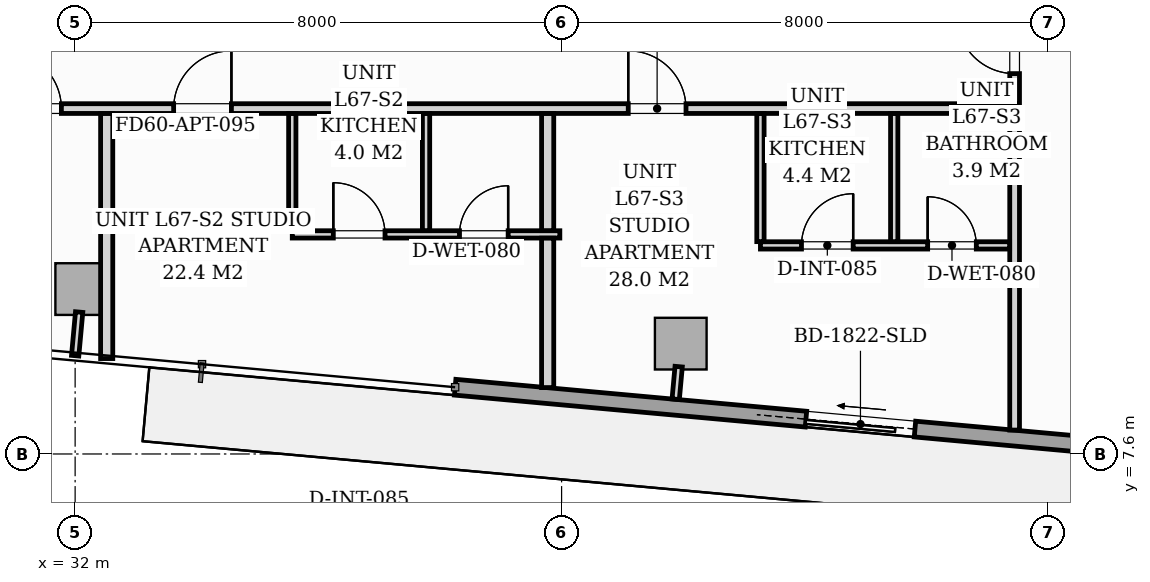
"""IFC4 building model, lengths in metres.
Left out: names, types, materials, properties, quantities, classifications, styles, units other than length and angle.
Written with IfcOpenShell. Run it as: python <this file> out.ifc"""

import sys

from ifc_helpers import new_model, si_unit, direction, frame, frame_2d, origin, origin_2d, place, context, subcontext, project, spatial, rectangle, extrude, source, transform, mapped, element, fill, save


model = new_model("IFC4")
c1 = context("Model", 3, precision=1e-05, world=origin(), true_north=direction((0.0, 1.0)))
c2 = subcontext(c1, "Body", "Model", "MODEL_VIEW")
j1 = project(units=[si_unit("LENGTHUNIT", "METRE"), si_unit("PLANEANGLEUNIT", "RADIAN")], contexts=[c1])
p1 = place(None, origin())
s1 = spatial("IfcSite", under=j1, at=p1, CompositionType="ELEMENT")
p2 = place(p1, origin())
s2 = spatial("IfcBuilding", under=s1, at=p2, CompositionType="ELEMENT")
p3 = place(p2, frame((0.0, 0.0, 233.1)))
s3 = spatial("IfcBuildingStorey", under=s2, at=p3, CompositionType="ELEMENT", Elevation=233.1)
m1 = source(origin(), c2, "Body", "SweptSolid", [
    extrude(rectangle(XDim=0.85, YDim=0.85, at=origin_2d()), origin(), (0.0, 0.0, 1.0), 3.296),
])
for number, where, z_axis, x_axis in (
    (1, (32.1, 10.312, 0.002), (0.0, 0.0, 1.0), (0.996, -0.091, 0.0)),
    (2, (41.96, 9.415, 0.002), (0.0, 0.0, 1.0), (0.996, -0.091, 0.0)),
):
    element("IfcColumn", number, at=place(p3, frame(where, z_axis=z_axis, x_axis=x_axis)), inside=s3, PredefinedType="COLUMN", context=c2, shape_type="MappedRepresentation", body=[
        mapped(m1, transform((0.0, 0.0, 0.0), scale=1.0)),
    ])
p4 = place(p3, frame((52.819, 7.372, 0.0), z_axis=(0.0, 0.0, 1.0), x_axis=(-0.995884447498, 0.090632043071, 0.0)))
e3 = element("IfcWall", 3, at=p4, inside=s3, PredefinedType="STANDARD", context=c2, shape_type="SweptSolid", body=[
    extrude(rectangle(XDim=14.63, YDim=0.26, at=frame_2d((7.315, 0.0))), origin(), (0.0, 0.0, 1.0), 3.04),
])
p5 = place(p4, frame((7.037, 0.0, 0.0)))
e4 = element("IfcOpeningElement", 4, at=p5, cuts=e3, PredefinedType="OPENING", context=c2, shape_type="SweptSolid", body=[
    extrude(rectangle(XDim=1.8, YDim=2.06, at=frame_2d((0.9, 1.03))), frame((0.0, 0.14, 0.0), z_axis=(0.0, -1.0, 0.0), x_axis=(1.0, 0.0, 0.0)), (0.0, 0.0, 1.0), 0.28),
])
p6 = place(p4, frame((2.05, 0.0, 0.65)))
e5 = element("IfcOpeningElement", 5, at=p6, cuts=e3, PredefinedType="OPENING", context=c2, shape_type="SweptSolid", body=[
    extrude(rectangle(XDim=1.6, YDim=1.5, at=frame_2d((0.8, 0.75))), frame((0.0, 0.14, 0.0), z_axis=(0.0, -1.0, 0.0), x_axis=(1.0, 0.0, 0.0)), (0.0, 0.0, 1.0), 0.28),
])
p7 = place(p3, frame((26.12, 13.28, 0.0), z_axis=(0.0, 0.0, 1.0), x_axis=(1.0, 0.0, 0.0)))
e6 = element("IfcWall", 6, at=p7, inside=s3, PredefinedType="PARTITIONING", context=c2, shape_type="SweptSolid", body=[
    extrude(rectangle(XDim=21.33, YDim=0.16, at=frame_2d((10.665, 0.0))), origin(), (0.0, 0.0, 1.0), 2.556),
])
p8 = place(p7, frame((4.704, 0.0, 0.0)))
e7 = element("IfcOpeningElement", 7, at=p8, cuts=e6, PredefinedType="OPENING", context=c2, shape_type="SweptSolid", body=[
    extrude(rectangle(XDim=0.95, YDim=2.06, at=frame_2d((0.475, 1.03))), frame((0.0, 0.09, 0.0), z_axis=(0.0, -1.0, 0.0), x_axis=(1.0, 0.0, 0.0)), (0.0, 0.0, 1.0), 0.18),
])
p9 = place(p7, frame((7.5, 0.0, 0.0)))
e8 = element("IfcOpeningElement", 8, at=p9, cuts=e6, PredefinedType="OPENING", context=c2, shape_type="SweptSolid", body=[
    extrude(rectangle(XDim=0.95, YDim=2.06, at=frame_2d((0.475, 1.03))), frame((0.0, 0.09, 0.0), z_axis=(0.0, -1.0, 0.0), x_axis=(1.0, 0.0, 0.0)), (0.0, 0.0, 1.0), 0.18),
])
p10 = place(p7, frame((14.976, 0.0, 0.0)))
e9 = element("IfcOpeningElement", 9, at=p10, cuts=e6, PredefinedType="OPENING", context=c2, shape_type="SweptSolid", body=[
    extrude(rectangle(XDim=0.95, YDim=2.06, at=frame_2d((0.475, 1.03))), frame((0.0, 0.09, 0.0), z_axis=(0.0, -1.0, 0.0), x_axis=(1.0, 0.0, 0.0)), (0.0, 0.0, 1.0), 0.18),
])
p11 = place(p3, frame((47.45, 7.993, 0.0), z_axis=(0.0, 0.0, 1.0), x_axis=(0.0, 1.0, 0.0)))
e10 = element("IfcWall", 10, at=p11, inside=s3, PredefinedType="PARTITIONING", context=c2, shape_type="SweptSolid", body=[
    extrude(rectangle(XDim=5.205, YDim=0.16, at=frame_2d((2.603, 0.0))), origin(), (0.0, 0.0, 1.0), 3.04),
])
p12 = place(p3, frame((47.45, 13.362, 0.0), z_axis=(0.0, 0.0, 1.0), x_axis=(0.0, 1.0, 0.0)))
e11 = element("IfcWall", 11, at=p12, inside=s3, PredefinedType="PARTITIONING", context=c2, shape_type="SweptSolid", body=[
    extrude(rectangle(XDim=7.288, YDim=0.16, at=frame_2d((3.644, 0.0))), origin(), (0.0, 0.0, 1.0), 3.04),
])
p13 = place(p12, frame((0.493, 0.0, 0.0)))
e12 = element("IfcOpeningElement", 12, at=p13, cuts=e11, PredefinedType="OPENING", context=c2, shape_type="SweptSolid", body=[
    extrude(rectangle(XDim=0.95, YDim=2.06, at=frame_2d((0.475, 1.03))), frame((0.0, 0.09, 0.0), z_axis=(0.0, -1.0, 0.0), x_axis=(1.0, 0.0, 0.0)), (0.0, 0.0, 1.0), 0.18),
])
p14 = place(p12, frame((4.783, 0.0, 0.0)))
e13 = element("IfcOpeningElement", 13, at=p14, cuts=e11, PredefinedType="OPENING", context=c2, shape_type="SweptSolid", body=[
    extrude(rectangle(XDim=0.95, YDim=2.06, at=frame_2d((0.475, 1.03))), frame((0.0, 0.09, 0.0), z_axis=(0.0, -1.0, 0.0), x_axis=(1.0, 0.0, 0.0)), (0.0, 0.0, 1.0), 0.18),
])
p15 = place(p3, frame((32.519, 9.169, 0.0), z_axis=(0.0, 0.0, 1.0), x_axis=(0.0, 1.0, 0.0)))
e14 = element("IfcWall", 14, at=p15, inside=s3, PredefinedType="PARTITIONING", context=c2, shape_type="SweptSolid", body=[
    extrude(rectangle(XDim=4.029, YDim=0.2, at=frame_2d((2.014, 0.0))), origin(), (0.0, 0.0, 1.0), 2.4),
])
p16 = place(p3, frame((35.571, 11.211, 0.0), z_axis=(0.0, 0.0, 1.0), x_axis=(1.0, 0.0, 0.0)))
e15 = element("IfcWall", 15, at=p16, inside=s3, PredefinedType="PARTITIONING", context=c2, shape_type="SweptSolid", body=[
    extrude(rectangle(XDim=4.4, YDim=0.12, at=frame_2d((2.2, 0.0))), origin(), (0.0, 0.0, 1.0), 3.04),
])
p17 = place(p16, frame((0.675, 0.0, 0.0)))
e16 = element("IfcOpeningElement", 16, at=p17, cuts=e15, PredefinedType="OPENING", context=c2, shape_type="SweptSolid", body=[
    extrude(rectangle(XDim=0.85, YDim=2.05, at=frame_2d((0.425, 1.025))), frame((0.0, 0.07, 0.0), z_axis=(0.0, -1.0, 0.0), x_axis=(1.0, 0.0, 0.0)), (0.0, 0.0, 1.0), 0.14),
])
p18 = place(p16, frame((2.75, 0.0, 0.0)))
e17 = element("IfcOpeningElement", 17, at=p18, cuts=e15, PredefinedType="OPENING", context=c2, shape_type="SweptSolid", body=[
    extrude(rectangle(XDim=0.8, YDim=2.02, at=frame_2d((0.4, 1.01))), frame((0.0, 0.07, 0.0), z_axis=(0.0, -1.0, 0.0), x_axis=(1.0, 0.0, 0.0)), (0.0, 0.0, 1.0), 0.14),
])
for number, where, z_axis, x_axis in (
    (18, (35.571, 11.273, 0.0), (0.0, 0.0, 1.0), (0.0, 1.0, 0.0)),
    (19, (37.771, 11.273, 0.0), (0.0, 0.0, 1.0), (0.0, 1.0, 0.0)),
):
    element("IfcWall", number, at=place(p3, frame(where, z_axis=z_axis, x_axis=x_axis)), inside=s3, PredefinedType="PARTITIONING", context=c2, shape_type="SweptSolid", body=[
        extrude(rectangle(XDim=1.925, YDim=0.12, at=frame_2d((0.962, 0.0))), origin(), (0.0, 0.0, 1.0), 3.04),
    ])
p19 = place(p3, frame((39.771, 8.692, 0.0), z_axis=(0.0, 0.0, 1.0), x_axis=(0.0, 1.0, 0.0)))
e20 = element("IfcWall", 20, at=p19, inside=s3, PredefinedType="PARTITIONING", context=c2, shape_type="SweptSolid", body=[
    extrude(rectangle(XDim=2.457, YDim=0.2, at=frame_2d((1.229, 0.0))), origin(), (0.0, 0.0, 1.0), 3.04),
])
p20 = place(p3, frame((39.771, 11.273, 0.0), z_axis=(0.0, 0.0, 1.0), x_axis=(0.0, 1.0, 0.0)))
e21 = element("IfcWall", 21, at=p20, inside=s3, PredefinedType="PARTITIONING", context=c2, shape_type="SweptSolid", body=[
    extrude(rectangle(XDim=1.925, YDim=0.2, at=frame_2d((0.962, 0.0))), origin(), (0.0, 0.0, 1.0), 3.04),
])
p21 = place(p3, frame((43.27, 11.03, 0.0), z_axis=(0.0, 0.0, 1.0), x_axis=(1.0, 0.0, 0.0)))
e22 = element("IfcWall", 22, at=p21, inside=s3, PredefinedType="PARTITIONING", context=c2, shape_type="SweptSolid", body=[
    extrude(rectangle(XDim=4.098, YDim=0.12, at=frame_2d((2.049, 0.0))), origin(), (0.0, 0.0, 1.0), 3.04),
])
p22 = place(p21, frame((0.675, 0.0, 0.0)))
e23 = element("IfcOpeningElement", 23, at=p22, cuts=e22, PredefinedType="OPENING", context=c2, shape_type="SweptSolid", body=[
    extrude(rectangle(XDim=0.85, YDim=2.05, at=frame_2d((0.425, 1.025))), frame((0.0, 0.07, 0.0), z_axis=(0.0, -1.0, 0.0), x_axis=(1.0, 0.0, 0.0)), (0.0, 0.0, 1.0), 0.14),
])
p23 = place(p21, frame((2.75, 0.0, 0.0)))
e24 = element("IfcOpeningElement", 24, at=p23, cuts=e22, PredefinedType="OPENING", context=c2, shape_type="SweptSolid", body=[
    extrude(rectangle(XDim=0.8, YDim=2.02, at=frame_2d((0.4, 1.01))), frame((0.0, 0.07, 0.0), z_axis=(0.0, -1.0, 0.0), x_axis=(1.0, 0.0, 0.0)), (0.0, 0.0, 1.0), 0.14),
])
for number, where, z_axis, x_axis in (
    (25, (43.27, 11.092, 0.0), (0.0, 0.0, 1.0), (0.0, 1.0, 0.0)),
    (26, (45.47, 11.092, 0.0), (0.0, 0.0, 1.0), (0.0, 1.0, 0.0)),
):
    element("IfcWall", number, at=place(p3, frame(where, z_axis=z_axis, x_axis=x_axis)), inside=s3, PredefinedType="PARTITIONING", context=c2, shape_type="SweptSolid", body=[
        extrude(rectangle(XDim=2.106, YDim=0.12, at=frame_2d((1.053, 0.0))), origin(), (0.0, 0.0, 1.0), 3.04),
    ])
p24 = place(p3, frame((32.066, 9.933, 0.0), z_axis=(0.0, 0.0, 1.0), x_axis=(-0.090872036342, -0.995862577373, 0.0)))
e27 = element("IfcWall", 27, at=p24, inside=s3, PredefinedType="PARTITIONING", context=c2, shape_type="SweptSolid", body=[
    extrude(rectangle(XDim=0.72, YDim=0.12, at=frame_2d((0.36, 0.0))), origin(), (0.0, 0.0, 1.0), 3.04),
])
p25 = place(p3, frame((41.925, 9.036, 0.0), z_axis=(0.0, 0.0, 1.0), x_axis=(-0.090740281653, -0.995874591144, 0.0)))
e28 = element("IfcWall", 28, at=p25, inside=s3, PredefinedType="PARTITIONING", context=c2, shape_type="SweptSolid", body=[
    extrude(rectangle(XDim=0.538, YDim=0.12, at=frame_2d((0.269, 0.0))), origin(), (0.0, 0.0, 1.0), 3.04),
])
m2 = source(origin(), c2, "Body", "SweptSolid", [
    extrude(rectangle(XDim=1.8, YDim=2.06, at=frame_2d((0.9, 1.03))), frame((0.0, 0.025, 0.0), z_axis=(0.0, -1.0, 0.0), x_axis=(1.0, 0.0, 0.0)), (0.0, 0.0, 1.0), 0.05),
])
p26 = place(p5, origin())
e29 = element("IfcDoor", 29, at=p26, inside=s3, OperationType="SLIDING_TO_RIGHT", PredefinedType="DOOR", context=c2, shape_type="MappedRepresentation", body=[
    mapped(m2, transform((0.0, 0.0, 0.0), scale=1.0)),
])
fill(e4, e29)
m3 = source(origin(), c2, "Body", "SweptSolid", [
    extrude(rectangle(XDim=0.95, YDim=2.06, at=frame_2d((0.475, 1.03))), frame((0.0, 0.025, 0.0), z_axis=(0.0, -1.0, 0.0), x_axis=(1.0, 0.0, 0.0)), (0.0, 0.0, 1.0), 0.05),
])
p27 = place(p8, origin())
e30 = element("IfcDoor", 30, at=p27, inside=s3, OperationType="SINGLE_SWING_LEFT", PredefinedType="DOOR", context=c2, shape_type="MappedRepresentation", body=[
    mapped(m3, transform((0.0, 0.0, 0.0), scale=1.0)),
])
fill(e7, e30)
p28 = place(p9, origin())
e31 = element("IfcDoor", 31, at=p28, inside=s3, OperationType="SINGLE_SWING_RIGHT", PredefinedType="DOOR", context=c2, shape_type="MappedRepresentation", body=[
    mapped(m3, transform((0.0, 0.0, 0.0), scale=1.0)),
])
fill(e8, e31)
m4 = source(origin(), c2, "Body", "SweptSolid", [
    extrude(rectangle(XDim=0.85, YDim=2.05, at=frame_2d((0.425, 1.025))), frame((0.0, 0.025, 0.0), z_axis=(0.0, -1.0, 0.0), x_axis=(1.0, 0.0, 0.0)), (0.0, 0.0, 1.0), 0.05),
])
p29 = place(p17, origin())
e32 = element("IfcDoor", 32, at=p29, inside=s3, OperationType="SINGLE_SWING_LEFT", PredefinedType="DOOR", context=c2, shape_type="MappedRepresentation", body=[
    mapped(m4, transform((0.0, 0.0, 0.0), scale=1.0)),
])
fill(e16, e32)
m5 = source(origin(), c2, "Body", "SweptSolid", [
    extrude(rectangle(XDim=0.8, YDim=2.02, at=frame_2d((0.4, 1.01))), frame((0.0, 0.025, 0.0), z_axis=(0.0, -1.0, 0.0), x_axis=(1.0, 0.0, 0.0)), (0.0, 0.0, 1.0), 0.05),
])
p30 = place(p18, origin())
e33 = element("IfcDoor", 33, at=p30, inside=s3, OperationType="SINGLE_SWING_RIGHT", PredefinedType="DOOR", context=c2, shape_type="MappedRepresentation", body=[
    mapped(m5, transform((0.0, 0.0, 0.0), scale=1.0)),
])
fill(e17, e33)
p31 = place(p10, origin())
e34 = element("IfcDoor", 34, at=p31, inside=s3, OperationType="SINGLE_SWING_LEFT", PredefinedType="DOOR", context=c2, shape_type="MappedRepresentation", body=[
    mapped(m3, transform((0.0, 0.0, 0.0), scale=1.0)),
])
fill(e9, e34)
p32 = place(p22, origin())
e35 = element("IfcDoor", 35, at=p32, inside=s3, OperationType="SINGLE_SWING_RIGHT", PredefinedType="DOOR", context=c2, shape_type="MappedRepresentation", body=[
    mapped(m4, transform((0.0, 0.0, 0.0), scale=1.0)),
])
fill(e23, e35)
p33 = place(p23, origin())
e36 = element("IfcDoor", 36, at=p33, inside=s3, OperationType="SINGLE_SWING_LEFT", PredefinedType="DOOR", context=c2, shape_type="MappedRepresentation", body=[
    mapped(m5, transform((0.0, 0.0, 0.0), scale=1.0)),
])
fill(e24, e36)
p34 = place(p13, origin())
e37 = element("IfcDoor", 37, at=p34, inside=s3, OperationType="SINGLE_SWING_RIGHT", PredefinedType="DOOR", context=c2, shape_type="MappedRepresentation", body=[
    mapped(m3, transform((0.0, 0.0, 0.0), scale=1.0)),
])
fill(e12, e37)
save(model, sys.argv[1])
